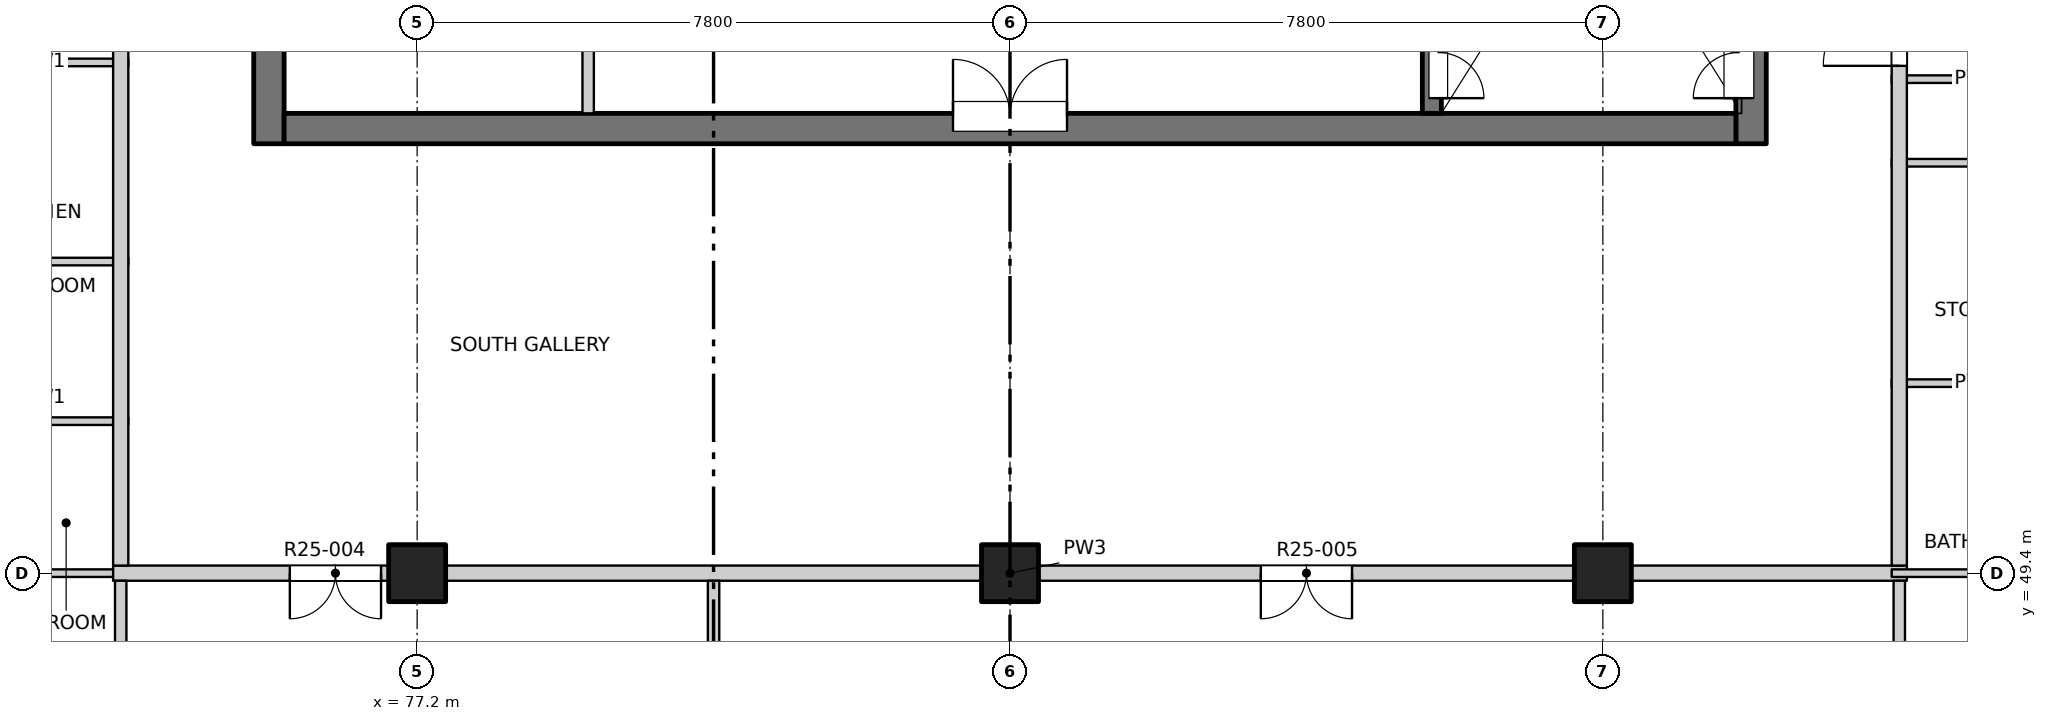
"""IFC4 building model, lengths in metres.
Left out: names, types, materials, properties, quantities, classifications, styles, units other than length and angle.
Written with IfcOpenShell. Run it as: python <this file> out.ifc"""

import sys

from ifc_helpers import new_model, si_unit, direction, frame, frame_2d, origin, origin_2d, place, context, subcontext, project, spatial, rectangle, extrude, element, fill, save


model = new_model("IFC4")
c1 = context("Model", 3, precision=1e-05, world=origin(), true_north=direction((0.0, 1.0)))
c2 = subcontext(c1, "Body", "Model", "MODEL_VIEW")
j1 = project(units=[si_unit("LENGTHUNIT", "METRE"), si_unit("PLANEANGLEUNIT", "RADIAN")], contexts=[c1])
p1 = place(None, origin())
s1 = spatial("IfcSite", under=j1, at=p1, CompositionType="ELEMENT")
p2 = place(p1, origin())
s2 = spatial("IfcBuilding", under=s1, at=p2, CompositionType="ELEMENT")
p3 = place(p2, frame((0.0, 0.0, 252.8)))
s3 = spatial("IfcBuildingStorey", under=s2, at=p3, CompositionType="ELEMENT", Elevation=252.8)
for number, where, z_axis, x_axis in (
    (1, (77.2, 49.4, -0.25), (0.0, 0.0, 1.0), (1.0, 0.0, 0.0)),
    (2, (85.0, 49.4, -0.25), (0.0, 0.0, 1.0), (1.0, 0.0, 0.0)),
    (3, (92.8, 49.4, -0.25), (0.0, 0.0, 1.0), (1.0, 0.0, 0.0)),
):
    element("IfcColumn", number, at=place(p3, frame(where, z_axis=z_axis, x_axis=x_axis)), inside=s3, PredefinedType="COLUMN", context=c2, shape_type="SweptSolid", body=[
        extrude(rectangle(XDim=0.75, YDim=0.75, at=origin_2d()), origin(), (0.0, 0.0, 1.0), 3.4),
    ])
p4 = place(p3, frame((75.25, 55.05, -0.25), z_axis=(0.0, 0.0, 1.0), x_axis=(0.0, 1.0, 0.0)))
e4 = element("IfcWall", 4, at=p4, inside=s3, PredefinedType="SOLIDWALL", context=c2, shape_type="SweptSolid", body=[
    extrude(rectangle(XDim=22.25, YDim=0.4, at=frame_2d((11.125, 0.0))), origin(), (0.0, 0.0, 1.0), 3.4),
])
p5 = place(p4, frame((7.4, 0.0, 0.25)))
e5 = element("IfcOpeningElement", 5, at=p5, cuts=e4, PredefinedType="OPENING", context=c2, shape_type="SweptSolid", body=[
    extrude(rectangle(XDim=0.9, YDim=2.1, at=frame_2d((0.45, 1.05))), frame((0.0, 0.21, 0.0), z_axis=(0.0, -1.0, 0.0), x_axis=(1.0, 0.0, 0.0)), (0.0, 0.0, 1.0), 0.42),
])
p6 = place(p4, frame((10.7, 0.0, 0.25)))
e6 = element("IfcOpeningElement", 6, at=p6, cuts=e4, PredefinedType="OPENING", context=c2, shape_type="SweptSolid", body=[
    extrude(rectangle(XDim=0.9, YDim=2.1, at=frame_2d((0.45, 1.05))), frame((0.0, 0.21, 0.0), z_axis=(0.0, -1.0, 0.0), x_axis=(1.0, 0.0, 0.0)), (0.0, 0.0, 1.0), 0.42),
])
p7 = place(p4, frame((15.2, 0.0, 0.25)))
e7 = element("IfcOpeningElement", 7, at=p7, cuts=e4, PredefinedType="OPENING", context=c2, shape_type="SweptSolid", body=[
    extrude(rectangle(XDim=0.9, YDim=2.1, at=frame_2d((0.45, 1.05))), frame((0.0, 0.21, 0.0), z_axis=(0.0, -1.0, 0.0), x_axis=(1.0, 0.0, 0.0)), (0.0, 0.0, 1.0), 0.42),
])
p8 = place(p4, frame((20.0, 0.0, 0.25)))
e8 = element("IfcOpeningElement", 8, at=p8, cuts=e4, PredefinedType="OPENING", context=c2, shape_type="SweptSolid", body=[
    extrude(rectangle(XDim=0.9, YDim=2.1, at=frame_2d((0.45, 1.05))), frame((0.0, 0.21, 0.0), z_axis=(0.0, -1.0, 0.0), x_axis=(1.0, 0.0, 0.0)), (0.0, 0.0, 1.0), 0.42),
])
p9 = place(p3, frame((94.75, 55.05, -0.25), z_axis=(0.0, 0.0, 1.0), x_axis=(0.0, 1.0, 0.0)))
e9 = element("IfcWall", 9, at=p9, inside=s3, PredefinedType="SOLIDWALL", context=c2, shape_type="SweptSolid", body=[
    extrude(rectangle(XDim=6.9, YDim=0.4, at=frame_2d((3.45, 0.0))), origin(), (0.0, 0.0, 1.0), 3.4),
])
p10 = place(p9, frame((0.6, 0.0, 0.25)))
e10 = element("IfcOpeningElement", 10, at=p10, cuts=e9, PredefinedType="OPENING", context=c2, shape_type="SweptSolid", body=[
    extrude(rectangle(XDim=1.2, YDim=2.1, at=frame_2d((0.6, 1.05))), frame((0.0, 0.21, 0.0), z_axis=(0.0, -1.0, 0.0), x_axis=(1.0, 0.0, 0.0)), (0.0, 0.0, 1.0), 0.42),
])
p11 = place(p3, frame((75.45, 55.25, -0.25), z_axis=(0.0, 0.0, 1.0), x_axis=(1.0, 0.0, 0.0)))
e11 = element("IfcWall", 11, at=p11, inside=s3, PredefinedType="SOLIDWALL", context=c2, shape_type="SweptSolid", body=[
    extrude(rectangle(XDim=19.1, YDim=0.4, at=frame_2d((9.55, 0.0))), origin(), (0.0, 0.0, 1.0), 3.4),
])
p12 = place(p11, frame((8.8, 0.0, 0.25)))
e12 = element("IfcOpeningElement", 12, at=p12, cuts=e11, PredefinedType="OPENING", context=c2, shape_type="SweptSolid", body=[
    extrude(rectangle(XDim=1.5, YDim=2.1, at=frame_2d((0.75, 1.05))), frame((0.0, 0.21, 0.0), z_axis=(0.0, -1.0, 0.0), x_axis=(1.0, 0.0, 0.0)), (0.0, 0.0, 1.0), 0.42),
])
p13 = place(p3, frame((90.55, 55.45, -0.25), z_axis=(0.0, 0.0, 1.0), x_axis=(0.0, 1.0, 0.0)))
e13 = element("IfcWall", 13, at=p13, inside=s3, PredefinedType="SOLIDWALL", context=c2, shape_type="SweptSolid", body=[
    extrude(rectangle(XDim=6.5, YDim=0.25, at=frame_2d((3.25, 0.0))), origin(), (0.0, 0.0, 1.0), 3.4),
])
p14 = place(p13, frame((0.2, 0.0, 0.25)))
e14 = element("IfcOpeningElement", 14, at=p14, cuts=e13, PredefinedType="OPENING", context=c2, shape_type="SweptSolid", body=[
    extrude(rectangle(XDim=1.2, YDim=2.1, at=frame_2d((0.6, 1.05))), frame((0.0, 0.135, 0.0), z_axis=(0.0, -1.0, 0.0), x_axis=(1.0, 0.0, 0.0)), (0.0, 0.0, 1.0), 0.27),
])
p15 = place(p3, frame((65.8, 49.4, 0.0), z_axis=(0.0, 0.0, 1.0), x_axis=(1.0, 0.0, 0.0)))
e15 = element("IfcWall", 15, at=p15, inside=s3, PredefinedType="PARTITIONING", context=c2, shape_type="SweptSolid", body=[
    extrude(rectangle(XDim=7.6, YDim=0.1, at=frame_2d((3.8, 0.0))), origin(), (0.0, 0.0, 1.0), 3.15),
])
p16 = place(p15, frame((4.09, 0.0, 0.0)))
e16 = element("IfcOpeningElement", 16, at=p16, cuts=e15, PredefinedType="OPENING", context=c2, shape_type="SweptSolid", body=[
    extrude(rectangle(XDim=0.9, YDim=2.1, at=frame_2d((0.45, 1.05))), frame((0.0, 0.06, 0.0), z_axis=(0.0, -1.0, 0.0), x_axis=(1.0, 0.0, 0.0)), (0.0, 0.0, 1.0), 0.12),
])
p17 = place(p3, frame((73.2, 49.4, 0.0), z_axis=(0.0, 0.0, 1.0), x_axis=(1.0, 0.0, 0.0)))
e17 = element("IfcWall", 17, at=p17, inside=s3, PredefinedType="PARTITIONING", context=c2, shape_type="SweptSolid", body=[
    extrude(rectangle(XDim=23.6, YDim=0.2, at=frame_2d((11.8, 0.0))), origin(), (0.0, 0.0, 1.0), 3.15),
])
p18 = place(p17, frame((2.325, 0.0, 0.0)))
e18 = element("IfcOpeningElement", 18, at=p18, cuts=e17, PredefinedType="OPENING", context=c2, shape_type="SweptSolid", body=[
    extrude(rectangle(XDim=1.2, YDim=2.1, at=frame_2d((0.6, 1.05))), frame((0.0, 0.11, 0.0), z_axis=(0.0, -1.0, 0.0), x_axis=(1.0, 0.0, 0.0)), (0.0, 0.0, 1.0), 0.22),
])
p19 = place(p17, frame((15.1, 0.0, 0.0)))
e19 = element("IfcOpeningElement", 19, at=p19, cuts=e17, PredefinedType="OPENING", context=c2, shape_type="SweptSolid", body=[
    extrude(rectangle(XDim=1.2, YDim=2.1, at=frame_2d((0.6, 1.05))), frame((0.0, 0.11, 0.0), z_axis=(0.0, -1.0, 0.0), x_axis=(1.0, 0.0, 0.0)), (0.0, 0.0, 1.0), 0.22),
])
p20 = place(p3, frame((96.6, 49.4, 0.0), z_axis=(0.0, 0.0, 1.0), x_axis=(1.0, 0.0, 0.0)))
e20 = element("IfcWall", 20, at=p20, inside=s3, PredefinedType="PARTITIONING", context=c2, shape_type="SweptSolid", body=[
    extrude(rectangle(XDim=7.6, YDim=0.1, at=frame_2d((3.8, 0.0))), origin(), (0.0, 0.0, 1.0), 3.15),
])
p21 = place(p20, frame((2.61, 0.0, 0.0)))
e21 = element("IfcOpeningElement", 21, at=p21, cuts=e20, PredefinedType="OPENING", context=c2, shape_type="SweptSolid", body=[
    extrude(rectangle(XDim=0.9, YDim=2.1, at=frame_2d((0.45, 1.05))), frame((0.0, 0.06, 0.0), z_axis=(0.0, -1.0, 0.0), x_axis=(1.0, 0.0, 0.0)), (0.0, 0.0, 1.0), 0.12),
])
for number, where, z_axis, x_axis in (
    (22, (71.18, 51.4, 0.0), (0.0, 0.0, 1.0), (1.0, 0.0, 0.0)),
    (23, (96.6, 51.9, 0.0), (0.0, 0.0, 1.0), (1.0, 0.0, 0.0)),
    (24, (71.18, 53.5, 0.0), (0.0, 0.0, 1.0), (1.0, 0.0, 0.0)),
    (25, (96.6, 54.8, 0.0), (0.0, 0.0, 1.0), (1.0, 0.0, 0.0)),
    (26, (96.6, 55.9, 0.0), (0.0, 0.0, 1.0), (1.0, 0.0, 0.0)),
    (27, (71.18, 56.12, 0.0), (0.0, 0.0, 1.0), (1.0, 0.0, 0.0)),
):
    element("IfcWall", number, at=place(p3, frame(where, z_axis=z_axis, x_axis=x_axis)), inside=s3, PredefinedType="PARTITIONING", context=c2, shape_type="SweptSolid", body=[
        extrude(rectangle(XDim=2.22, YDim=0.1, at=frame_2d((1.11, 0.0))), origin(), (0.0, 0.0, 1.0), 3.15),
    ])
p22 = place(p3, frame((73.3, 45.8, 0.0), z_axis=(0.0, 0.0, 1.0), x_axis=(0.0, 1.0, 0.0)))
e28 = element("IfcWall", 28, at=p22, inside=s3, PredefinedType="PARTITIONING", context=c2, shape_type="SweptSolid", body=[
    extrude(rectangle(XDim=3.5, YDim=0.15, at=frame_2d((1.75, 0.0))), origin(), (0.0, 0.0, 1.0), 3.15),
])
p23 = place(p3, frame((73.3, 49.5, 0.0), z_axis=(0.0, 0.0, 1.0), x_axis=(0.0, 1.0, 0.0)))
e29 = element("IfcWall", 29, at=p23, inside=s3, PredefinedType="PARTITIONING", context=c2, shape_type="SweptSolid", body=[
    extrude(rectangle(XDim=34.7, YDim=0.2, at=frame_2d((17.35, 0.0))), origin(), (0.0, 0.0, 1.0), 3.15),
])
p24 = place(p23, frame((10.175, 0.0, 0.0)))
e30 = element("IfcOpeningElement", 30, at=p24, cuts=e29, PredefinedType="OPENING", context=c2, shape_type="SweptSolid", body=[
    extrude(rectangle(XDim=1.0, YDim=2.1, at=frame_2d((0.5, 1.05))), frame((0.0, 0.11, 0.0), z_axis=(0.0, -1.0, 0.0), x_axis=(1.0, 0.0, 0.0)), (0.0, 0.0, 1.0), 0.22),
])
p25 = place(p23, frame((21.475, 0.0, 0.0)))
e31 = element("IfcOpeningElement", 31, at=p25, cuts=e29, PredefinedType="OPENING", context=c2, shape_type="SweptSolid", body=[
    extrude(rectangle(XDim=1.0, YDim=2.1, at=frame_2d((0.5, 1.05))), frame((0.0, 0.11, 0.0), z_axis=(0.0, -1.0, 0.0), x_axis=(1.0, 0.0, 0.0)), (0.0, 0.0, 1.0), 0.22),
])
p26 = place(p23, frame((29.875, 0.0, 0.0)))
e32 = element("IfcOpeningElement", 32, at=p26, cuts=e29, PredefinedType="OPENING", context=c2, shape_type="SweptSolid", body=[
    extrude(rectangle(XDim=1.0, YDim=2.1, at=frame_2d((0.5, 1.05))), frame((0.0, 0.11, 0.0), z_axis=(0.0, -1.0, 0.0), x_axis=(1.0, 0.0, 0.0)), (0.0, 0.0, 1.0), 0.22),
])
p27 = place(p3, frame((79.45, 55.45, 0.0), z_axis=(0.0, 0.0, 1.0), x_axis=(0.0, 1.0, 0.0)))
e33 = element("IfcWall", 33, at=p27, inside=s3, PredefinedType="PARTITIONING", context=c2, shape_type="SweptSolid", body=[
    extrude(rectangle(XDim=5.45, YDim=0.15, at=frame_2d((2.725, 0.0))), origin(), (0.0, 0.0, 1.0), 3.15),
])
p28 = place(p27, frame((2.25, 0.0, 0.0)))
e34 = element("IfcOpeningElement", 34, at=p28, cuts=e33, PredefinedType="OPENING", context=c2, shape_type="SweptSolid", body=[
    extrude(rectangle(XDim=0.9, YDim=2.1, at=frame_2d((0.45, 1.05))), frame((0.0, 0.085, 0.0), z_axis=(0.0, -1.0, 0.0), x_axis=(1.0, 0.0, 0.0)), (0.0, 0.0, 1.0), 0.17),
])
p29 = place(p3, frame((81.1, 45.8, 0.0), z_axis=(0.0, 0.0, 1.0), x_axis=(0.0, 1.0, 0.0)))
e35 = element("IfcWall", 35, at=p29, inside=s3, PredefinedType="PARTITIONING", context=c2, shape_type="SweptSolid", body=[
    extrude(rectangle(XDim=3.5, YDim=0.15, at=frame_2d((1.75, 0.0))), origin(), (0.0, 0.0, 1.0), 2.55),
])
p30 = place(p3, frame((96.7, 45.8, 0.0), z_axis=(0.0, 0.0, 1.0), x_axis=(0.0, 1.0, 0.0)))
e36 = element("IfcWall", 36, at=p30, inside=s3, PredefinedType="PARTITIONING", context=c2, shape_type="SweptSolid", body=[
    extrude(rectangle(XDim=3.5, YDim=0.15, at=frame_2d((1.75, 0.0))), origin(), (0.0, 0.0, 1.0), 3.15),
])
p31 = place(p3, frame((96.7, 49.5, 0.0), z_axis=(0.0, 0.0, 1.0), x_axis=(0.0, 1.0, 0.0)))
e37 = element("IfcWall", 37, at=p31, inside=s3, PredefinedType="PARTITIONING", context=c2, shape_type="SweptSolid", body=[
    extrude(rectangle(XDim=34.7, YDim=0.2, at=frame_2d((17.35, 0.0))), origin(), (0.0, 0.0, 1.0), 3.15),
])
p32 = place(p31, frame((6.575, 0.0, 0.0)))
e38 = element("IfcOpeningElement", 38, at=p32, cuts=e37, PredefinedType="OPENING", context=c2, shape_type="SweptSolid", body=[
    extrude(rectangle(XDim=1.0, YDim=2.1, at=frame_2d((0.5, 1.05))), frame((0.0, 0.11, 0.0), z_axis=(0.0, -1.0, 0.0), x_axis=(1.0, 0.0, 0.0)), (0.0, 0.0, 1.0), 0.22),
])
p33 = place(p31, frame((13.975, 0.0, 0.0)))
e39 = element("IfcOpeningElement", 39, at=p33, cuts=e37, PredefinedType="OPENING", context=c2, shape_type="SweptSolid", body=[
    extrude(rectangle(XDim=1.0, YDim=2.1, at=frame_2d((0.5, 1.05))), frame((0.0, 0.11, 0.0), z_axis=(0.0, -1.0, 0.0), x_axis=(1.0, 0.0, 0.0)), (0.0, 0.0, 1.0), 0.22),
])
p34 = place(p31, frame((26.525, 0.0, 0.0)))
e40 = element("IfcOpeningElement", 40, at=p34, cuts=e37, PredefinedType="OPENING", context=c2, shape_type="SweptSolid", body=[
    extrude(rectangle(XDim=1.0, YDim=2.1, at=frame_2d((0.5, 1.05))), frame((0.0, 0.11, 0.0), z_axis=(0.0, -1.0, 0.0), x_axis=(1.0, 0.0, 0.0)), (0.0, 0.0, 1.0), 0.22),
])
p35 = place(p18, origin())
e41 = element("IfcDoor", 41, at=p35, inside=s3, OperationType="DOUBLE_DOOR_SINGLE_SWING", PredefinedType="DOOR", context=c2, shape_type="SweptSolid", body=[
    extrude(rectangle(XDim=1.2, YDim=2.1, at=frame_2d((0.6, 1.05))), frame((0.0, 0.025, 0.0), z_axis=(0.0, -1.0, 0.0), x_axis=(1.0, 0.0, 0.0)), (0.0, 0.0, 1.0), 0.05),
])
fill(e18, e41)
p36 = place(p19, origin())
e42 = element("IfcDoor", 42, at=p36, inside=s3, OperationType="DOUBLE_DOOR_SINGLE_SWING", PredefinedType="DOOR", context=c2, shape_type="SweptSolid", body=[
    extrude(rectangle(XDim=1.2, YDim=2.1, at=frame_2d((0.6, 1.05))), frame((0.0, 0.025, 0.0), z_axis=(0.0, -1.0, 0.0), x_axis=(1.0, 0.0, 0.0)), (0.0, 0.0, 1.0), 0.05),
])
fill(e19, e42)
p37 = place(p12, origin())
e43 = element("IfcDoor", 43, at=p37, inside=s3, OperationType="DOUBLE_DOOR_SINGLE_SWING", PredefinedType="DOOR", context=c2, shape_type="SweptSolid", body=[
    extrude(rectangle(XDim=1.5, YDim=2.1, at=frame_2d((0.75, 1.05))), frame((0.0, 0.185, 0.0), z_axis=(0.0, -1.0, 0.0), x_axis=(1.0, 0.0, 0.0)), (0.0, 0.0, 1.0), 0.05),
])
fill(e12, e43)
p38 = place(p14, origin())
e44 = element("IfcDoor", 44, at=p38, inside=s3, OperationType="DOUBLE_DOOR_SINGLE_SWING", PredefinedType="DOOR", context=c2, shape_type="SweptSolid", body=[
    extrude(rectangle(XDim=1.2, YDim=2.1, at=frame_2d((0.6, 1.05))), frame((0.0, -0.06, 0.0), z_axis=(0.0, -1.0, 0.0), x_axis=(1.0, 0.0, 0.0)), (0.0, 0.0, 1.0), 0.05),
])
fill(e14, e44)
p39 = place(p10, origin())
e45 = element("IfcDoor", 45, at=p39, inside=s3, OperationType="DOUBLE_DOOR_SINGLE_SWING", PredefinedType="DOOR", context=c2, shape_type="SweptSolid", body=[
    extrude(rectangle(XDim=1.2, YDim=2.1, at=frame_2d((0.6, 1.05))), frame((0.0, 0.185, 0.0), z_axis=(0.0, -1.0, 0.0), x_axis=(1.0, 0.0, 0.0)), (0.0, 0.0, 1.0), 0.05),
])
fill(e10, e45)
p40 = place(p32, origin())
e46 = element("IfcDoor", 46, at=p40, inside=s3, OperationType="SINGLE_SWING_LEFT", PredefinedType="DOOR", context=c2, shape_type="SweptSolid", body=[
    extrude(rectangle(XDim=1.0, YDim=2.1, at=frame_2d((0.5, 1.05))), frame((0.0, 0.025, 0.0), z_axis=(0.0, -1.0, 0.0), x_axis=(1.0, 0.0, 0.0)), (0.0, 0.0, 1.0), 0.05),
])
fill(e38, e46)
save(model, sys.argv[1])
